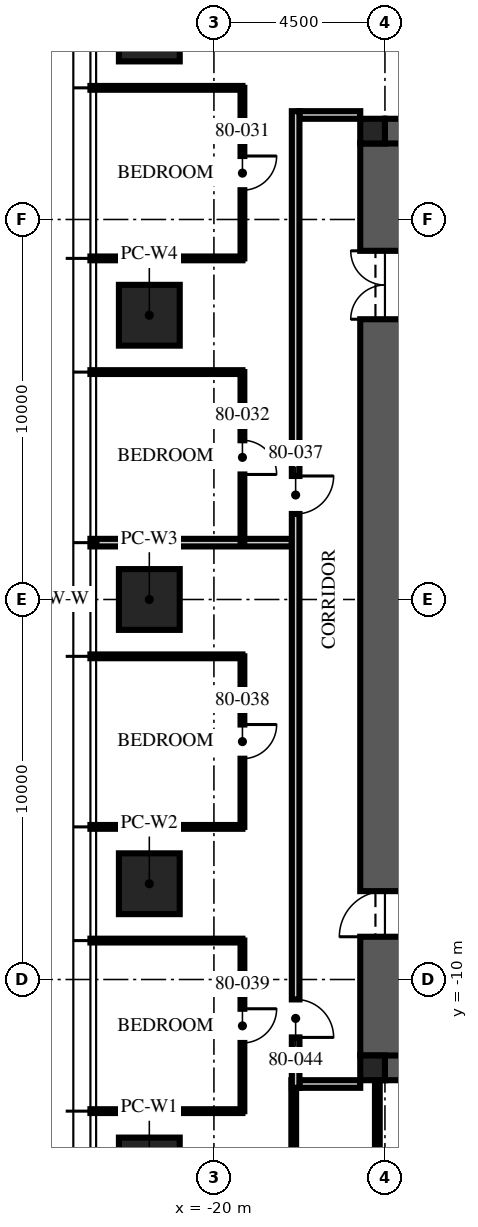
"""IFC4 building model, lengths in metres.
Left out: names, types, materials, properties, quantities, classifications, styles, units other than length and angle.
Written with IfcOpenShell. Run it as: python <this file> out.ifc"""

import sys

from ifc_helpers import new_model, si_unit, direction, frame, frame_2d, origin, origin_2d, place, context, subcontext, project, spatial, rectangle, extrude, element, fill, save


model = new_model("IFC4")
c1 = context("Model", 3, precision=1e-05, world=origin(), true_north=direction((0.0, 1.0)))
c2 = subcontext(c1, "Body", "Model", "MODEL_VIEW")
j1 = project(units=[si_unit("LENGTHUNIT", "METRE"), si_unit("PLANEANGLEUNIT", "RADIAN")], contexts=[c1])
p1 = place(None, origin())
s1 = spatial("IfcSite", under=j1, at=p1, CompositionType="ELEMENT")
p2 = place(p1, origin())
s2 = spatial("IfcBuilding", under=s1, at=p2, CompositionType="ELEMENT")
p3 = place(p2, frame((0.0, 0.0, 319.5)))
s3 = spatial("IfcBuildingStorey", under=s2, at=p3, CompositionType="ELEMENT", Elevation=319.5)
for number, where, z_axis, x_axis in (
    (1, (-15.5, 12.0, -0.25), (0.0, 0.0, 1.0), (1.0, 0.0, 0.0)),
    (2, (-15.5, -12.0, -0.25), (0.0, 0.0, 1.0), (1.0, 0.0, 0.0)),
):
    element("IfcWall", number, at=place(p3, frame(where, z_axis=z_axis, x_axis=x_axis)), inside=s3, PredefinedType="SHEAR", context=c2, shape_type="SweptSolid", body=[
        extrude(rectangle(XDim=31.0, YDim=1.3, at=frame_2d((15.5, 0.0))), origin(), (0.0, 0.0, 1.0), 3.75),
    ])
p4 = place(p3, frame((-15.5, -12.0, -0.25), z_axis=(0.0, 0.0, 1.0), x_axis=(0.0, 1.0, 0.0)))
e3 = element("IfcWall", 3, at=p4, inside=s3, PredefinedType="SHEAR", context=c2, shape_type="SweptSolid", body=[
    extrude(rectangle(XDim=24.0, YDim=1.3, at=frame_2d((12.0, 0.0))), origin(), (0.0, 0.0, 1.0), 3.75),
])
p5 = place(p4, frame((3.125, 0.0, 0.25)))
e4 = element("IfcOpeningElement", 4, at=p5, cuts=e3, PredefinedType="OPENING", context=c2, shape_type="SweptSolid", body=[
    extrude(rectangle(XDim=1.2, YDim=2.1, at=frame_2d((0.6, 1.05))), frame((0.0, 0.66, 0.0), z_axis=(0.0, -1.0, 0.0), x_axis=(1.0, 0.0, 0.0)), (0.0, 0.0, 1.0), 1.32),
])
p6 = place(p4, frame((19.375, 0.0, 0.25)))
e5 = element("IfcOpeningElement", 5, at=p6, cuts=e3, PredefinedType="OPENING", context=c2, shape_type="SweptSolid", body=[
    extrude(rectangle(XDim=1.8, YDim=2.1, at=frame_2d((0.9, 1.05))), frame((0.0, 0.66, 0.0), z_axis=(0.0, -1.0, 0.0), x_axis=(1.0, 0.0, 0.0)), (0.0, 0.0, 1.0), 1.32),
])
for number, where, z_axis, x_axis in (
    (6, (-15.825, 12.325, -0.25), (0.0, 0.0, 1.0), (1.0, 0.0, 0.0)),
    (7, (-15.825, -12.325, -0.25), (0.0, 0.0, 1.0), (1.0, 0.0, 0.0)),
):
    element("IfcColumn", number, at=place(p3, frame(where, z_axis=z_axis, x_axis=x_axis)), inside=s3, PredefinedType="COLUMN", context=c2, shape_type="SweptSolid", body=[
        extrude(rectangle(XDim=0.65, YDim=0.65, at=origin_2d()), origin(), (0.0, 0.0, 1.0), 3.75),
    ])
for number, where, z_axis, x_axis in (
    (8, (-21.7, -14.96, 0.0), (0.0, 0.0, 1.0), (0.0, 1.0, 0.0)),
    (9, (-21.7, -7.48, 0.0), (0.0, 0.0, 1.0), (0.0, 1.0, 0.0)),
    (10, (-21.7, 0.0, 0.0), (0.0, 0.0, 1.0), (0.0, 1.0, 0.0)),
    (11, (-21.7, 7.48, 0.0), (0.0, 0.0, 1.0), (0.0, 1.0, 0.0)),
    (12, (-21.7, 14.96, 0.0), (0.0, 0.0, 1.0), (0.0, 1.0, 0.0)),
):
    element("IfcColumn", number, at=place(p3, frame(where, z_axis=z_axis, x_axis=x_axis)), inside=s3, PredefinedType="COLUMN", context=c2, shape_type="SweptSolid", body=[
        extrude(rectangle(XDim=1.6, YDim=1.6, at=origin_2d()), origin(), (0.0, 0.0, 1.0), 3.75),
    ])
for number, where, z_axis, x_axis in (
    (13, (-16.15, 12.75, 0.0), (0.0, 0.0, 1.0), (-1.0, 0.0, 0.0)),
    (14, (-16.15, -12.75, 0.0), (0.0, 0.0, 1.0), (-1.0, 0.0, 0.0)),
):
    element("IfcWall", number, at=place(p3, frame(where, z_axis=z_axis, x_axis=x_axis)), inside=s3, PredefinedType="PARTITIONING", context=c2, shape_type="SweptSolid", body=[
        extrude(rectangle(XDim=1.6, YDim=0.2, at=frame_2d((0.8, 0.0))), origin(), (0.0, 0.0, 1.0), 2.6),
    ])
for number, where, z_axis, x_axis in (
    (15, (-19.25, 13.464, 0.0), (0.0, 0.0, 1.0), (-1.0, 0.0, 0.0)),
    (16, (-19.25, 8.976, 0.0), (0.0, 0.0, 1.0), (-1.0, 0.0, 0.0)),
    (17, (-19.25, 5.984, 0.0), (0.0, 0.0, 1.0), (-1.0, 0.0, 0.0)),
):
    element("IfcWall", number, at=place(p3, frame(where, z_axis=z_axis, x_axis=x_axis)), inside=s3, PredefinedType="PARTITIONING", context=c2, shape_type="SweptSolid", body=[
        extrude(rectangle(XDim=4.0, YDim=0.1, at=frame_2d((2.0, 0.0))), origin(), (0.0, 0.0, 1.0), 3.01),
    ])
p7 = place(p3, frame((-17.95, 1.496, 0.0), z_axis=(0.0, 0.0, 1.0), x_axis=(-1.0, 0.0, 0.0)))
e18 = element("IfcWall", 18, at=p7, inside=s3, PredefinedType="PARTITIONING", context=c2, shape_type="SweptSolid", body=[
    extrude(rectangle(XDim=5.3, YDim=0.2, at=frame_2d((2.65, 0.0))), origin(), (0.0, 0.0, 1.0), 3.01),
])
for number, where, z_axis, x_axis in (
    (19, (-19.25, -1.496, 0.0), (0.0, 0.0, 1.0), (-1.0, 0.0, 0.0)),
    (20, (-19.25, -5.984, 0.0), (0.0, 0.0, 1.0), (-1.0, 0.0, 0.0)),
    (21, (-19.25, -8.976, 0.0), (0.0, 0.0, 1.0), (-1.0, 0.0, 0.0)),
    (22, (-19.25, -13.464, 0.0), (0.0, 0.0, 1.0), (-1.0, 0.0, 0.0)),
):
    element("IfcWall", number, at=place(p3, frame(where, z_axis=z_axis, x_axis=x_axis)), inside=s3, PredefinedType="PARTITIONING", context=c2, shape_type="SweptSolid", body=[
        extrude(rectangle(XDim=4.0, YDim=0.1, at=frame_2d((2.0, 0.0))), origin(), (0.0, 0.0, 1.0), 3.01),
    ])
p8 = place(p3, frame((-19.25, 13.464, 0.0), z_axis=(0.0, 0.0, 1.0), x_axis=(0.0, -1.0, 0.0)))
e23 = element("IfcWall", 23, at=p8, inside=s3, PredefinedType="PARTITIONING", context=c2, shape_type="SweptSolid", body=[
    extrude(rectangle(XDim=4.488, YDim=0.1, at=frame_2d((2.244, 0.0))), origin(), (0.0, 0.0, 1.0), 2.91),
])
p9 = place(p8, frame((1.794, 0.0, 0.0)))
e24 = element("IfcOpeningElement", 24, at=p9, cuts=e23, PredefinedType="OPENING", context=c2, shape_type="SweptSolid", body=[
    extrude(rectangle(XDim=0.9, YDim=2.1, at=frame_2d((0.45, 1.05))), frame((0.0, 0.06, 0.0), z_axis=(0.0, -1.0, 0.0), x_axis=(1.0, 0.0, 0.0)), (0.0, 0.0, 1.0), 0.12),
])
p10 = place(p3, frame((-19.25, 5.984, 0.0), z_axis=(0.0, 0.0, 1.0), x_axis=(0.0, -1.0, 0.0)))
e25 = element("IfcWall", 25, at=p10, inside=s3, PredefinedType="PARTITIONING", context=c2, shape_type="SweptSolid", body=[
    extrude(rectangle(XDim=4.488, YDim=0.1, at=frame_2d((2.244, 0.0))), origin(), (0.0, 0.0, 1.0), 2.91),
])
p11 = place(p10, frame((1.794, 0.0, 0.0)))
e26 = element("IfcOpeningElement", 26, at=p11, cuts=e25, PredefinedType="OPENING", context=c2, shape_type="SweptSolid", body=[
    extrude(rectangle(XDim=0.9, YDim=2.1, at=frame_2d((0.45, 1.05))), frame((0.0, 0.06, 0.0), z_axis=(0.0, -1.0, 0.0), x_axis=(1.0, 0.0, 0.0)), (0.0, 0.0, 1.0), 0.12),
])
p12 = place(p3, frame((-19.25, -1.496, 0.0), z_axis=(0.0, 0.0, 1.0), x_axis=(0.0, -1.0, 0.0)))
e27 = element("IfcWall", 27, at=p12, inside=s3, PredefinedType="PARTITIONING", context=c2, shape_type="SweptSolid", body=[
    extrude(rectangle(XDim=4.488, YDim=0.1, at=frame_2d((2.244, 0.0))), origin(), (0.0, 0.0, 1.0), 2.91),
])
p13 = place(p12, frame((1.794, 0.0, 0.0)))
e28 = element("IfcOpeningElement", 28, at=p13, cuts=e27, PredefinedType="OPENING", context=c2, shape_type="SweptSolid", body=[
    extrude(rectangle(XDim=0.9, YDim=2.1, at=frame_2d((0.45, 1.05))), frame((0.0, 0.06, 0.0), z_axis=(0.0, -1.0, 0.0), x_axis=(1.0, 0.0, 0.0)), (0.0, 0.0, 1.0), 0.12),
])
p14 = place(p3, frame((-19.25, -8.976, 0.0), z_axis=(0.0, 0.0, 1.0), x_axis=(0.0, -1.0, 0.0)))
e29 = element("IfcWall", 29, at=p14, inside=s3, PredefinedType="PARTITIONING", context=c2, shape_type="SweptSolid", body=[
    extrude(rectangle(XDim=4.488, YDim=0.1, at=frame_2d((2.244, 0.0))), origin(), (0.0, 0.0, 1.0), 2.91),
])
p15 = place(p14, frame((1.794, 0.0, 0.0)))
e30 = element("IfcOpeningElement", 30, at=p15, cuts=e29, PredefinedType="OPENING", context=c2, shape_type="SweptSolid", body=[
    extrude(rectangle(XDim=0.9, YDim=2.1, at=frame_2d((0.45, 1.05))), frame((0.0, 0.06, 0.0), z_axis=(0.0, -1.0, 0.0), x_axis=(1.0, 0.0, 0.0)), (0.0, 0.0, 1.0), 0.12),
])
for number, where, z_axis, x_axis in (
    (31, (-17.9, -12.65, 0.0), (0.0, 0.0, 1.0), (0.0, -1.0, 0.0)),
    (32, (-15.7, -12.65, 0.0), (0.0, 0.0, 1.0), (0.0, -1.0, 0.0)),
):
    element("IfcWall", number, at=place(p3, frame(where, z_axis=z_axis, x_axis=x_axis)), inside=s3, PredefinedType="PARTITIONING", context=c2, shape_type="SweptSolid", body=[
        extrude(rectangle(XDim=3.846, YDim=0.125, at=frame_2d((1.923, 0.0))), origin(), (0.0, 0.0, 1.0), 2.6),
    ])
p16 = place(p3, frame((-17.85, 12.85, 0.0), z_axis=(0.0, 0.0, 1.0), x_axis=(0.0, -1.0, 0.0)))
e33 = element("IfcWall", 33, at=p16, inside=s3, PredefinedType="PARTITIONING", context=c2, shape_type="SweptSolid", body=[
    extrude(rectangle(XDim=25.7, YDim=0.2, at=frame_2d((12.85, 0.0))), origin(), (0.0, 0.0, 1.0), 2.9),
])
p17 = place(p16, frame((9.6, 0.0, 0.0)))
e34 = element("IfcOpeningElement", 34, at=p17, cuts=e33, PredefinedType="OPENING", context=c2, shape_type="SweptSolid", body=[
    extrude(rectangle(XDim=1.0, YDim=2.2, at=frame_2d((0.5, 1.1))), frame((0.0, 0.11, 0.0), z_axis=(0.0, -1.0, 0.0), x_axis=(1.0, 0.0, 0.0)), (0.0, 0.0, 1.0), 0.22),
])
p18 = place(p16, frame((23.374, 0.0, 0.0)))
e35 = element("IfcOpeningElement", 35, at=p18, cuts=e33, PredefinedType="OPENING", context=c2, shape_type="SweptSolid", body=[
    extrude(rectangle(XDim=1.0, YDim=2.2, at=frame_2d((0.5, 1.1))), frame((0.0, 0.11, 0.0), z_axis=(0.0, -1.0, 0.0), x_axis=(1.0, 0.0, 0.0)), (0.0, 0.0, 1.0), 0.22),
])
p19 = place(p5, origin())
e36 = element("IfcDoor", 36, at=p19, inside=s3, OperationType="SINGLE_SWING_LEFT", PredefinedType="DOOR", context=c2, shape_type="SweptSolid", body=[
    extrude(rectangle(XDim=1.2, YDim=2.1, at=frame_2d((0.6, 1.05))), frame((0.0, 0.025, 0.0), z_axis=(0.0, -1.0, 0.0), x_axis=(1.0, 0.0, 0.0)), (0.0, 0.0, 1.0), 0.05),
])
fill(e4, e36)
p20 = place(p6, origin())
e37 = element("IfcDoor", 37, at=p20, inside=s3, OperationType="DOUBLE_DOOR_SINGLE_SWING", PredefinedType="DOOR", context=c2, shape_type="SweptSolid", body=[
    extrude(rectangle(XDim=1.8, YDim=2.1, at=frame_2d((0.9, 1.05))), frame((0.0, 0.025, 0.0), z_axis=(0.0, -1.0, 0.0), x_axis=(1.0, 0.0, 0.0)), (0.0, 0.0, 1.0), 0.05),
])
fill(e5, e37)
p21 = place(p9, origin())
e38 = element("IfcDoor", 38, at=p21, inside=s3, OperationType="SINGLE_SWING_LEFT", PredefinedType="DOOR", context=c2, shape_type="SweptSolid", body=[
    extrude(rectangle(XDim=0.9, YDim=2.1, at=frame_2d((0.45, 1.05))), frame((0.0, 0.025, 0.0), z_axis=(0.0, -1.0, 0.0), x_axis=(1.0, 0.0, 0.0)), (0.0, 0.0, 1.0), 0.05),
])
fill(e24, e38)
p22 = place(p11, origin())
e39 = element("IfcDoor", 39, at=p22, inside=s3, OperationType="SINGLE_SWING_RIGHT", PredefinedType="DOOR", context=c2, shape_type="SweptSolid", body=[
    extrude(rectangle(XDim=0.9, YDim=2.1, at=frame_2d((0.45, 1.05))), frame((0.0, 0.025, 0.0), z_axis=(0.0, -1.0, 0.0), x_axis=(1.0, 0.0, 0.0)), (0.0, 0.0, 1.0), 0.05),
])
fill(e26, e39)
p23 = place(p17, origin())
e40 = element("IfcDoor", 40, at=p23, inside=s3, OperationType="SINGLE_SWING_LEFT", PredefinedType="DOOR", context=c2, shape_type="SweptSolid", body=[
    extrude(rectangle(XDim=1.0, YDim=2.2, at=frame_2d((0.5, 1.1))), frame((0.0, 0.025, 0.0), z_axis=(0.0, -1.0, 0.0), x_axis=(1.0, 0.0, 0.0)), (0.0, 0.0, 1.0), 0.05),
])
fill(e34, e40)
p24 = place(p13, origin())
e41 = element("IfcDoor", 41, at=p24, inside=s3, OperationType="SINGLE_SWING_LEFT", PredefinedType="DOOR", context=c2, shape_type="SweptSolid", body=[
    extrude(rectangle(XDim=0.9, YDim=2.1, at=frame_2d((0.45, 1.05))), frame((0.0, 0.025, 0.0), z_axis=(0.0, -1.0, 0.0), x_axis=(1.0, 0.0, 0.0)), (0.0, 0.0, 1.0), 0.05),
])
fill(e28, e41)
p25 = place(p15, origin())
e42 = element("IfcDoor", 42, at=p25, inside=s3, OperationType="SINGLE_SWING_LEFT", PredefinedType="DOOR", context=c2, shape_type="SweptSolid", body=[
    extrude(rectangle(XDim=0.9, YDim=2.1, at=frame_2d((0.45, 1.05))), frame((0.0, 0.025, 0.0), z_axis=(0.0, -1.0, 0.0), x_axis=(1.0, 0.0, 0.0)), (0.0, 0.0, 1.0), 0.05),
])
fill(e30, e42)
p26 = place(p18, origin())
e43 = element("IfcDoor", 43, at=p26, inside=s3, OperationType="SINGLE_SWING_RIGHT", PredefinedType="DOOR", context=c2, shape_type="SweptSolid", body=[
    extrude(rectangle(XDim=1.0, YDim=2.2, at=frame_2d((0.5, 1.1))), frame((0.0, 0.025, 0.0), z_axis=(0.0, -1.0, 0.0), x_axis=(1.0, 0.0, 0.0)), (0.0, 0.0, 1.0), 0.05),
])
fill(e35, e43)
save(model, sys.argv[1])
